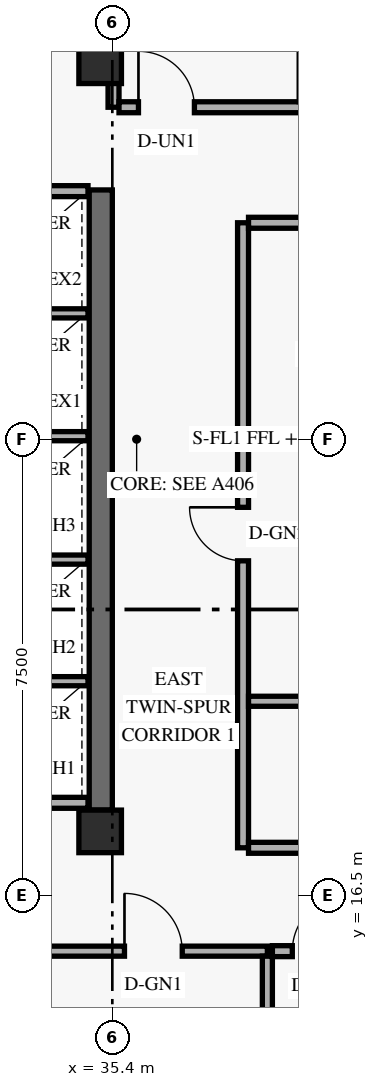
"""IFC4 building model, lengths in metres.
Left out: names, types, materials, properties, quantities, classifications, styles, units other than length and angle.
Written with IfcOpenShell. Run it as: python <this file> out.ifc"""

import sys

from ifc_helpers import new_model, si_unit, direction, frame, frame_2d, origin, origin_2d, place, context, subcontext, project, spatial, rectangle, extrude, element, fill, save


model = new_model("IFC4")
c1 = context("Model", 3, precision=1e-05, world=origin(), true_north=direction((0.0, 1.0)))
c2 = subcontext(c1, "Body", "Model", "MODEL_VIEW")
j1 = project(units=[si_unit("LENGTHUNIT", "METRE"), si_unit("PLANEANGLEUNIT", "RADIAN")], contexts=[c1])
p1 = place(None, origin())
s1 = spatial("IfcSite", under=j1, at=p1, CompositionType="ELEMENT")
p2 = place(p1, origin())
s2 = spatial("IfcBuilding", under=s1, at=p2, CompositionType="ELEMENT")
p3 = place(p2, frame((0.0, 0.0, 188.4)))
s3 = spatial("IfcBuildingStorey", under=s2, at=p3, CompositionType="ELEMENT", Elevation=188.4)
p4 = place(p3, frame((35.21, 17.9, 0.0), z_axis=(0.0, 0.0, 1.0), x_axis=(0.0, 1.0, 0.0)))
e1 = element("IfcWall", 1, at=p4, inside=s3, PredefinedType="SHEAR", context=c2, shape_type="SweptSolid", body=[
    extrude(rectangle(XDim=10.2, YDim=0.38, at=frame_2d((5.1, 0.0))), origin(), (0.0, 0.0, 1.0), 2.738),
])
for number, where, z_axis, x_axis in (
    (2, (35.2, 17.55, 0.0), (0.0, 0.0, 1.0), (1.0, 0.0, 0.0)),
    (3, (35.2, 30.2, 0.0), (0.0, 0.0, 1.0), (1.0, 0.0, 0.0)),
):
    element("IfcColumn", number, at=place(p3, frame(where, z_axis=z_axis, x_axis=x_axis)), inside=s3, PredefinedType="COLUMN", context=c2, shape_type="SweptSolid", body=[
        extrude(rectangle(XDim=0.7, YDim=0.7, at=origin_2d()), origin(), (0.0, 0.0, 1.0), 3.6),
    ])
for number, where, z_axis, x_axis in (
    (4, (32.74, 18.02, 0.0), (0.0, 0.0, 1.0), (1.0, 0.0, 0.0)),
    (5, (32.74, 28.08, 0.0), (0.0, 0.0, 1.0), (1.0, 0.0, 0.0)),
):
    element("IfcWall", number, at=place(p3, frame(where, z_axis=z_axis, x_axis=x_axis)), inside=s3, PredefinedType="STANDARD", context=c2, shape_type="SweptSolid", body=[
        extrude(rectangle(XDim=2.26, YDim=0.18, at=frame_2d((1.13, 0.0))), origin(), (0.0, 0.0, 1.0), 3.35),
    ])
for number, where, z_axis, x_axis in (
    (6, (32.74, 20.02, 0.0), (0.0, 0.0, 1.0), (1.0, 0.0, 0.0)),
    (7, (32.74, 22.02, 0.0), (0.0, 0.0, 1.0), (1.0, 0.0, 0.0)),
    (8, (32.74, 24.05, 0.0), (0.0, 0.0, 1.0), (1.0, 0.0, 0.0)),
    (9, (32.74, 26.07, 0.0), (0.0, 0.0, 1.0), (1.0, 0.0, 0.0)),
):
    element("IfcWall", number, at=place(p3, frame(where, z_axis=z_axis, x_axis=x_axis)), inside=s3, PredefinedType="STANDARD", context=c2, shape_type="SweptSolid", body=[
        extrude(rectangle(XDim=2.26, YDim=0.15, at=frame_2d((1.13, 0.0))), origin(), (0.0, 0.0, 1.0), 3.35),
    ])
p5 = place(p3, frame((32.732, 15.58, 0.0), z_axis=(0.0, 0.0, 1.0), x_axis=(1.0, 0.0, 0.0)))
e10 = element("IfcWall", 10, at=p5, inside=s3, PredefinedType="PARTITIONING", context=c2, shape_type="SweptSolid", body=[
    extrude(rectangle(XDim=5.218, YDim=0.165, at=frame_2d((2.609, 0.0))), origin(), (0.0, 0.0, 1.0), 2.72),
])
p6 = place(p5, frame((2.867, 0.0, 0.0)))
e11 = element("IfcOpeningElement", 11, at=p6, cuts=e10, PredefinedType="OPENING", context=c2, shape_type="SweptSolid", body=[
    extrude(rectangle(XDim=0.95, YDim=2.15, at=frame_2d((0.475, 1.075))), frame((0.0, 0.093, 0.0), z_axis=(0.0, -1.0, 0.0), x_axis=(1.0, 0.0, 0.0)), (0.0, 0.0, 1.0), 0.185),
])
p7 = place(p3, frame((37.95, 9.25, 0.0), z_axis=(0.0, 0.0, 1.0), x_axis=(0.0, 1.0, 0.0)))
e12 = element("IfcWall", 12, at=p7, inside=s3, PredefinedType="PARTITIONING", context=c2, shape_type="SweptSolid", body=[
    extrude(rectangle(XDim=6.248, YDim=0.165, at=frame_2d((3.124, 0.0))), origin(), (0.0, 0.0, 1.0), 2.72),
])
p8 = place(p3, frame((37.55, 17.28, 0.0), z_axis=(0.0, 0.0, 1.0), x_axis=(0.0, 1.0, 0.0)))
e13 = element("IfcWall", 13, at=p8, inside=s3, PredefinedType="STANDARD", context=c2, shape_type="SweptSolid", body=[
    extrude(rectangle(XDim=10.28, YDim=0.18, at=frame_2d((5.14, 0.0))), origin(), (0.0, 0.0, 1.0), 2.72),
])
p9 = place(p8, frame((4.72, 0.0, 0.0)))
e14 = element("IfcOpeningElement", 14, at=p9, cuts=e13, PredefinedType="OPENING", context=c2, shape_type="SweptSolid", body=[
    extrude(rectangle(XDim=0.88, YDim=2.12, at=frame_2d((0.44, 1.06))), frame((0.0, 0.1, 0.0), z_axis=(0.0, -1.0, 0.0), x_axis=(1.0, 0.0, 0.0)), (0.0, 0.0, 1.0), 0.2),
])
p10 = place(p3, frame((38.032, 15.58, 0.0), z_axis=(0.0, 0.0, 1.0), x_axis=(1.0, 0.0, 0.0)))
e15 = element("IfcWall", 15, at=p10, inside=s3, PredefinedType="STANDARD", context=c2, shape_type="SweptSolid", body=[
    extrude(rectangle(XDim=9.21, YDim=0.18, at=frame_2d((4.605, 0.0))), origin(), (0.0, 0.0, 1.0), 2.72),
])
p11 = place(p10, frame((0.327, 0.0, 0.0)))
e16 = element("IfcOpeningElement", 16, at=p11, cuts=e15, PredefinedType="OPENING", context=c2, shape_type="SweptSolid", body=[
    extrude(rectangle(XDim=0.92, YDim=2.15, at=frame_2d((0.46, 1.075))), frame((0.0, 0.1, 0.0), z_axis=(0.0, -1.0, 0.0), x_axis=(1.0, 0.0, 0.0)), (0.0, 0.0, 1.0), 0.2),
])
p12 = place(p3, frame((37.64, 17.28, 0.0), z_axis=(0.0, 0.0, 1.0), x_axis=(1.0, 0.0, 0.0)))
e17 = element("IfcWall", 17, at=p12, inside=s3, PredefinedType="STANDARD", context=c2, shape_type="SweptSolid", body=[
    extrude(rectangle(XDim=9.603, YDim=0.18, at=frame_2d((4.802, 0.0))), origin(), (0.0, 0.0, 1.0), 2.72),
])
p13 = place(p12, frame((1.31, 0.0, 0.0)))
e18 = element("IfcOpeningElement", 18, at=p13, cuts=e17, PredefinedType="OPENING", context=c2, shape_type="SweptSolid", body=[
    extrude(rectangle(XDim=0.95, YDim=2.15, at=frame_2d((0.475, 1.075))), frame((0.0, 0.1, 0.0), z_axis=(0.0, -1.0, 0.0), x_axis=(1.0, 0.0, 0.0)), (0.0, 0.0, 1.0), 0.2),
])
p14 = place(p3, frame((37.64, 27.56, 0.0), z_axis=(0.0, 0.0, 1.0), x_axis=(1.0, 0.0, 0.0)))
e19 = element("IfcWall", 19, at=p14, inside=s3, PredefinedType="STANDARD", context=c2, shape_type="SweptSolid", body=[
    extrude(rectangle(XDim=4.24, YDim=0.18, at=frame_2d((2.12, 0.0))), origin(), (0.0, 0.0, 1.0), 2.72),
])
p15 = place(p3, frame((35.42, 29.46, 0.0), z_axis=(0.0, 0.0, 1.0), x_axis=(0.0, 1.0, 0.0)))
e20 = element("IfcWall", 20, at=p15, inside=s3, PredefinedType="STANDARD", context=c2, shape_type="SweptSolid", body=[
    extrude(rectangle(XDim=1.89, YDim=0.18, at=frame_2d((0.945, 0.0))), origin(), (0.0, 0.0, 1.0), 2.72),
])
p16 = place(p3, frame((35.51, 29.46, 0.0), z_axis=(0.0, 0.0, 1.0), x_axis=(1.0, 0.0, 0.0)))
e21 = element("IfcWall", 21, at=p16, inside=s3, PredefinedType="STANDARD", context=c2, shape_type="SweptSolid", body=[
    extrude(rectangle(XDim=11.733, YDim=0.18, at=frame_2d((5.866, 0.0))), origin(), (0.0, 0.0, 1.0), 2.72),
])
p17 = place(p16, frame((0.32, 0.0, 0.0)))
e22 = element("IfcOpeningElement", 22, at=p17, cuts=e21, PredefinedType="OPENING", context=c2, shape_type="SweptSolid", body=[
    extrude(rectangle(XDim=0.92, YDim=2.15, at=frame_2d((0.46, 1.075))), frame((0.0, 0.1, 0.0), z_axis=(0.0, -1.0, 0.0), x_axis=(1.0, 0.0, 0.0)), (0.0, 0.0, 1.0), 0.2),
])
p18 = place(p3, frame((37.64, 19.69, 0.0), z_axis=(0.0, 0.0, 1.0), x_axis=(1.0, 0.0, 0.0)))
e23 = element("IfcWall", 23, at=p18, inside=s3, PredefinedType="PARTITIONING", context=c2, shape_type="SweptSolid", body=[
    extrude(rectangle(XDim=4.24, YDim=0.165, at=frame_2d((2.12, 0.0))), origin(), (0.0, 0.0, 1.0), 2.72),
])
p19 = place(p6, origin())
e24 = element("IfcDoor", 24, at=p19, inside=s3, OperationType="SINGLE_SWING_LEFT", PredefinedType="DOOR", context=c2, shape_type="SweptSolid", body=[
    extrude(rectangle(XDim=0.95, YDim=2.15, at=frame_2d((0.475, 1.075))), frame((0.0, 0.025, 0.0), z_axis=(0.0, -1.0, 0.0), x_axis=(1.0, 0.0, 0.0)), (0.0, 0.0, 1.0), 0.05),
])
fill(e11, e24)
p20 = place(p11, origin())
e25 = element("IfcDoor", 25, at=p20, inside=s3, OperationType="SINGLE_SWING_RIGHT", PredefinedType="DOOR", context=c2, shape_type="SweptSolid", body=[
    extrude(rectangle(XDim=0.92, YDim=2.15, at=frame_2d((0.46, 1.075))), frame((0.0, 0.025, 0.0), z_axis=(0.0, -1.0, 0.0), x_axis=(1.0, 0.0, 0.0)), (0.0, 0.0, 1.0), 0.05),
])
fill(e16, e25)
p21 = place(p17, origin())
e26 = element("IfcDoor", 26, at=p21, inside=s3, OperationType="SINGLE_SWING_LEFT", PredefinedType="DOOR", context=c2, shape_type="SweptSolid", body=[
    extrude(rectangle(XDim=0.92, YDim=2.15, at=frame_2d((0.46, 1.075))), frame((0.0, 0.025, 0.0), z_axis=(0.0, -1.0, 0.0), x_axis=(1.0, 0.0, 0.0)), (0.0, 0.0, 1.0), 0.05),
])
fill(e22, e26)
p22 = place(p9, origin())
e27 = element("IfcDoor", 27, at=p22, inside=s3, OperationType="SINGLE_SWING_RIGHT", PredefinedType="DOOR", context=c2, shape_type="SweptSolid", body=[
    extrude(rectangle(XDim=0.88, YDim=2.12, at=frame_2d((0.44, 1.06))), frame((0.0, 0.025, 0.0), z_axis=(0.0, -1.0, 0.0), x_axis=(1.0, 0.0, 0.0)), (0.0, 0.0, 1.0), 0.05),
])
fill(e14, e27)
save(model, sys.argv[1])
